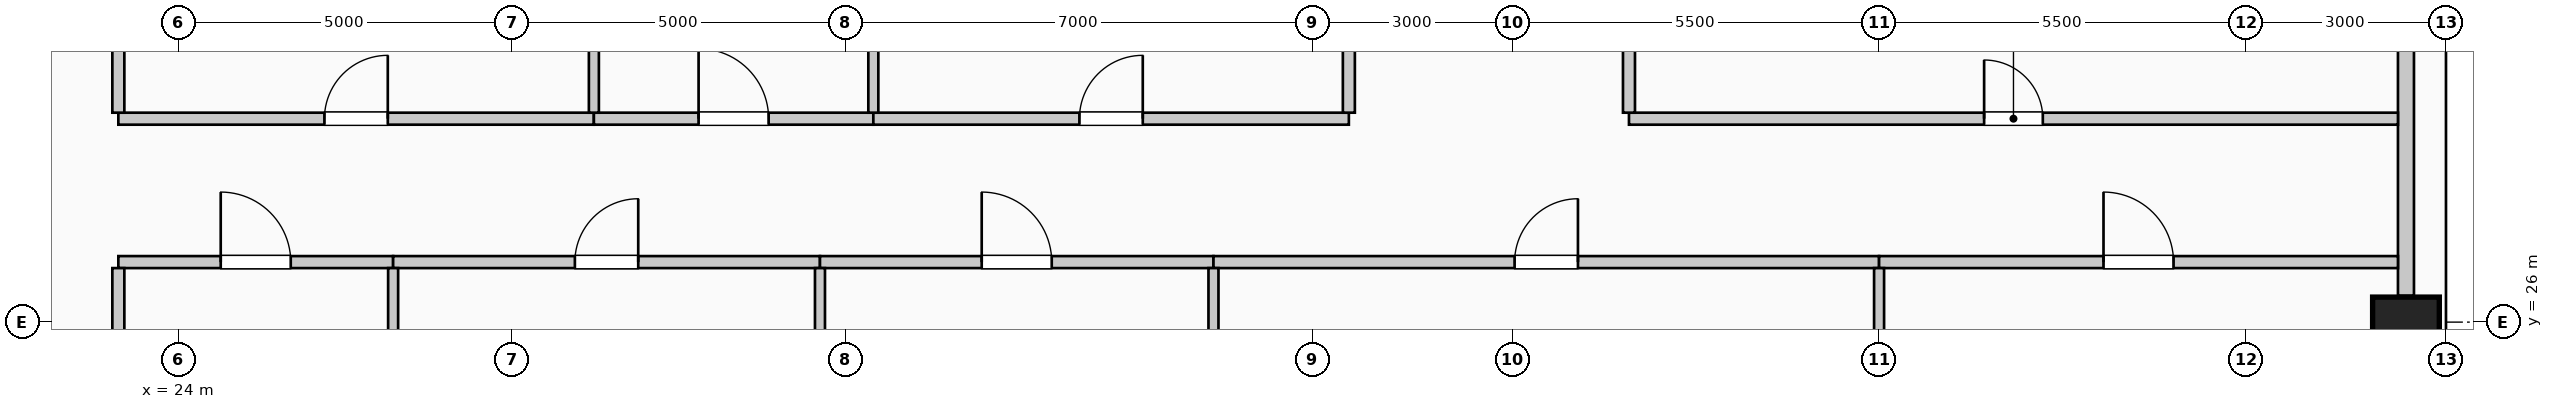
"""IFC4 building model, lengths in metres.
Left out: names, types, materials, properties, quantities, classifications, styles, units other than length and angle.
Written with IfcOpenShell. Run it as: python <this file> out.ifc"""

import sys

from ifc_helpers import new_model, si_unit, direction, frame, frame_2d, origin, origin_2d, place, context, subcontext, project, spatial, rectangle, extrude, element, fill, save


model = new_model("IFC4")
c1 = context("Model", 3, precision=1e-05, world=origin(), true_north=direction((0.0, 1.0)))
c2 = subcontext(c1, "Body", "Model", "MODEL_VIEW")
j1 = project(units=[si_unit("LENGTHUNIT", "METRE"), si_unit("PLANEANGLEUNIT", "RADIAN")], contexts=[c1])
p1 = place(None, origin())
s1 = spatial("IfcSite", under=j1, at=p1, CompositionType="ELEMENT")
p2 = place(p1, origin())
s2 = spatial("IfcBuilding", under=s1, at=p2, CompositionType="ELEMENT")
p3 = place(p2, frame((0.0, 0.0, 268.6)))
s3 = spatial("IfcBuildingStorey", under=s2, at=p3, CompositionType="ELEMENT", Elevation=268.6)
p4 = place(p3, frame((57.4, 26.0, 0.0), z_axis=(0.0, 0.0, 1.0), x_axis=(0.0, 1.0, 0.0)))
e1 = element("IfcColumn", 1, at=p4, inside=s3, PredefinedType="COLUMN", context=c2, shape_type="SweptSolid", body=[
    extrude(rectangle(XDim=0.75, YDim=1.0, at=origin_2d()), origin(), (0.0, 0.0, 1.0), 4.0),
])
p5 = place(p3, frame((57.4, 33.605, 0.0), z_axis=(0.0, 0.0, 1.0), x_axis=(0.0, -1.0, 0.0)))
e2 = element("IfcWall", 2, at=p5, inside=s3, PredefinedType="SOLIDWALL", context=c2, shape_type="SweptSolid", body=[
    extrude(rectangle(XDim=7.21, YDim=0.24, at=frame_2d((3.605, 0.0))), origin(), (0.0, 0.0, 1.0), 3.0),
])
p6 = place(p3, frame((23.1, 26.9, 0.0), z_axis=(0.0, 0.0, 1.0), x_axis=(1.0, 0.0, 0.0)))
e3 = element("IfcWall", 3, at=p6, inside=s3, PredefinedType="PARTITIONING", context=c2, shape_type="SweptSolid", body=[
    extrude(rectangle(XDim=4.12, YDim=0.18, at=frame_2d((2.06, 0.0))), origin(), (0.0, 0.0, 1.0), 3.75),
])
p7 = place(p6, frame((1.535, 0.0, 0.0)))
e4 = element("IfcOpeningElement", 4, at=p7, cuts=e3, PredefinedType="OPENING", context=c2, shape_type="SweptSolid", body=[
    extrude(rectangle(XDim=1.05, YDim=2.15, at=frame_2d((0.525, 1.075))), frame((0.0, 0.1, 0.0), z_axis=(0.0, -1.0, 0.0), x_axis=(1.0, 0.0, 0.0)), (0.0, 0.0, 1.0), 0.2),
])
p8 = place(p3, frame((27.22, 26.9, 0.0), z_axis=(0.0, 0.0, 1.0), x_axis=(1.0, 0.0, 0.0)))
e5 = element("IfcWall", 5, at=p8, inside=s3, PredefinedType="PARTITIONING", context=c2, shape_type="SweptSolid", body=[
    extrude(rectangle(XDim=6.4, YDim=0.18, at=frame_2d((3.2, 0.0))), origin(), (0.0, 0.0, 1.0), 3.75),
])
p9 = place(p8, frame((2.725, 0.0, 0.0)))
e6 = element("IfcOpeningElement", 6, at=p9, cuts=e5, PredefinedType="OPENING", context=c2, shape_type="SweptSolid", body=[
    extrude(rectangle(XDim=0.95, YDim=2.15, at=frame_2d((0.475, 1.075))), frame((0.0, 0.1, 0.0), z_axis=(0.0, -1.0, 0.0), x_axis=(1.0, 0.0, 0.0)), (0.0, 0.0, 1.0), 0.2),
])
p10 = place(p3, frame((33.62, 26.9, 0.0), z_axis=(0.0, 0.0, 1.0), x_axis=(1.0, 0.0, 0.0)))
e7 = element("IfcWall", 7, at=p10, inside=s3, PredefinedType="PARTITIONING", context=c2, shape_type="SweptSolid", body=[
    extrude(rectangle(XDim=5.9, YDim=0.18, at=frame_2d((2.95, 0.0))), origin(), (0.0, 0.0, 1.0), 3.75),
])
p11 = place(p10, frame((2.425, 0.0, 0.0)))
e8 = element("IfcOpeningElement", 8, at=p11, cuts=e7, PredefinedType="OPENING", context=c2, shape_type="SweptSolid", body=[
    extrude(rectangle(XDim=1.05, YDim=2.15, at=frame_2d((0.525, 1.075))), frame((0.0, 0.1, 0.0), z_axis=(0.0, -1.0, 0.0), x_axis=(1.0, 0.0, 0.0)), (0.0, 0.0, 1.0), 0.2),
])
p12 = place(p3, frame((39.52, 26.9, 0.0), z_axis=(0.0, 0.0, 1.0), x_axis=(1.0, 0.0, 0.0)))
e9 = element("IfcWall", 9, at=p12, inside=s3, PredefinedType="PARTITIONING", context=c2, shape_type="SweptSolid", body=[
    extrude(rectangle(XDim=9.98, YDim=0.18, at=frame_2d((4.99, 0.0))), origin(), (0.0, 0.0, 1.0), 3.75),
])
p13 = place(p12, frame((4.515, 0.0, 0.0)))
e10 = element("IfcOpeningElement", 10, at=p13, cuts=e9, PredefinedType="OPENING", context=c2, shape_type="SweptSolid", body=[
    extrude(rectangle(XDim=0.95, YDim=2.15, at=frame_2d((0.475, 1.075))), frame((0.0, 0.1, 0.0), z_axis=(0.0, -1.0, 0.0), x_axis=(1.0, 0.0, 0.0)), (0.0, 0.0, 1.0), 0.2),
])
p14 = place(p3, frame((49.5, 26.9, 0.0), z_axis=(0.0, 0.0, 1.0), x_axis=(1.0, 0.0, 0.0)))
e11 = element("IfcWall", 11, at=p14, inside=s3, PredefinedType="PARTITIONING", context=c2, shape_type="SweptSolid", body=[
    extrude(rectangle(XDim=7.78, YDim=0.18, at=frame_2d((3.89, 0.0))), origin(), (0.0, 0.0, 1.0), 3.75),
])
p15 = place(p14, frame((3.365, 0.0, 0.0)))
e12 = element("IfcOpeningElement", 12, at=p15, cuts=e11, PredefinedType="OPENING", context=c2, shape_type="SweptSolid", body=[
    extrude(rectangle(XDim=1.05, YDim=2.15, at=frame_2d((0.525, 1.075))), frame((0.0, 0.1, 0.0), z_axis=(0.0, -1.0, 0.0), x_axis=(1.0, 0.0, 0.0)), (0.0, 0.0, 1.0), 0.2),
])
p16 = place(p3, frame((23.1, 29.05, 0.0), z_axis=(0.0, 0.0, 1.0), x_axis=(1.0, 0.0, 0.0)))
e13 = element("IfcWall", 13, at=p16, inside=s3, PredefinedType="PARTITIONING", context=c2, shape_type="SweptSolid", body=[
    extrude(rectangle(XDim=7.13, YDim=0.18, at=frame_2d((3.565, 0.0))), origin(), (0.0, 0.0, 1.0), 3.75),
])
p17 = place(p16, frame((3.09, 0.0, 0.0)))
e14 = element("IfcOpeningElement", 14, at=p17, cuts=e13, PredefinedType="OPENING", context=c2, shape_type="SweptSolid", body=[
    extrude(rectangle(XDim=0.95, YDim=2.15, at=frame_2d((0.475, 1.075))), frame((0.0, 0.1, 0.0), z_axis=(0.0, -1.0, 0.0), x_axis=(1.0, 0.0, 0.0)), (0.0, 0.0, 1.0), 0.2),
])
p18 = place(p3, frame((30.23, 29.05, 0.0), z_axis=(0.0, 0.0, 1.0), x_axis=(1.0, 0.0, 0.0)))
e15 = element("IfcWall", 15, at=p18, inside=s3, PredefinedType="PARTITIONING", context=c2, shape_type="SweptSolid", body=[
    extrude(rectangle(XDim=4.19, YDim=0.18, at=frame_2d((2.095, 0.0))), origin(), (0.0, 0.0, 1.0), 3.75),
])
p19 = place(p18, frame((1.57, 0.0, 0.0)))
e16 = element("IfcOpeningElement", 16, at=p19, cuts=e15, PredefinedType="OPENING", context=c2, shape_type="SweptSolid", body=[
    extrude(rectangle(XDim=1.05, YDim=2.15, at=frame_2d((0.525, 1.075))), frame((0.0, 0.1, 0.0), z_axis=(0.0, -1.0, 0.0), x_axis=(1.0, 0.0, 0.0)), (0.0, 0.0, 1.0), 0.2),
])
p20 = place(p3, frame((34.42, 29.05, 0.0), z_axis=(0.0, 0.0, 1.0), x_axis=(1.0, 0.0, 0.0)))
e17 = element("IfcWall", 17, at=p20, inside=s3, PredefinedType="PARTITIONING", context=c2, shape_type="SweptSolid", body=[
    extrude(rectangle(XDim=7.13, YDim=0.18, at=frame_2d((3.565, 0.0))), origin(), (0.0, 0.0, 1.0), 3.75),
])
p21 = place(p20, frame((3.09, 0.0, 0.0)))
e18 = element("IfcOpeningElement", 18, at=p21, cuts=e17, PredefinedType="OPENING", context=c2, shape_type="SweptSolid", body=[
    extrude(rectangle(XDim=0.95, YDim=2.15, at=frame_2d((0.475, 1.075))), frame((0.0, 0.1, 0.0), z_axis=(0.0, -1.0, 0.0), x_axis=(1.0, 0.0, 0.0)), (0.0, 0.0, 1.0), 0.2),
])
p22 = place(p3, frame((45.75, 29.05, 0.0), z_axis=(0.0, 0.0, 1.0), x_axis=(1.0, 0.0, 0.0)))
e19 = element("IfcWall", 19, at=p22, inside=s3, PredefinedType="PARTITIONING", context=c2, shape_type="SweptSolid", body=[
    extrude(rectangle(XDim=11.53, YDim=0.18, at=frame_2d((5.765, 0.0))), origin(), (0.0, 0.0, 1.0), 3.75),
])
p23 = place(p22, frame((5.325, 0.0, 0.0)))
e20 = element("IfcOpeningElement", 20, at=p23, cuts=e19, PredefinedType="OPENING", context=c2, shape_type="SweptSolid", body=[
    extrude(rectangle(XDim=0.88, YDim=2.1, at=frame_2d((0.44, 1.05))), frame((0.0, 0.1, 0.0), z_axis=(0.0, -1.0, 0.0), x_axis=(1.0, 0.0, 0.0)), (0.0, 0.0, 1.0), 0.2),
])
p24 = place(p3, frame((23.1, 17.3, 0.0), z_axis=(0.0, 0.0, 1.0), x_axis=(0.0, 1.0, 0.0)))
e21 = element("IfcWall", 21, at=p24, inside=s3, PredefinedType="PARTITIONING", context=c2, shape_type="SweptSolid", body=[
    extrude(rectangle(XDim=9.51, YDim=0.18, at=frame_2d((4.755, 0.0))), origin(), (0.0, 0.0, 1.0), 3.75),
])
p25 = place(p3, frame((23.1, 29.14, 0.0), z_axis=(0.0, 0.0, 1.0), x_axis=(0.0, 1.0, 0.0)))
e22 = element("IfcWall", 22, at=p25, inside=s3, PredefinedType="PARTITIONING", context=c2, shape_type="SweptSolid", body=[
    extrude(rectangle(XDim=3.12, YDim=0.18, at=frame_2d((1.56, 0.0))), origin(), (0.0, 0.0, 1.0), 3.75),
])
p26 = place(p3, frame((27.22, 0.72, 0.0), z_axis=(0.0, 0.0, 1.0), x_axis=(0.0, 1.0, 0.0)))
e23 = element("IfcWall", 23, at=p26, inside=s3, PredefinedType="PARTITIONING", context=c2, shape_type="SweptSolid", body=[
    extrude(rectangle(XDim=26.09, YDim=0.15, at=frame_2d((13.045, 0.0))), origin(), (0.0, 0.0, 1.0), 3.75),
])
p27 = place(p3, frame((30.23, 29.14, 0.0), z_axis=(0.0, 0.0, 1.0), x_axis=(0.0, 1.0, 0.0)))
e24 = element("IfcWall", 24, at=p27, inside=s3, PredefinedType="PARTITIONING", context=c2, shape_type="SweptSolid", body=[
    extrude(rectangle(XDim=16.14, YDim=0.15, at=frame_2d((8.07, 0.0))), origin(), (0.0, 0.0, 1.0), 3.75),
])
p28 = place(p3, frame((33.62, 18.425, 0.0), z_axis=(0.0, 0.0, 1.0), x_axis=(0.0, 1.0, 0.0)))
e25 = element("IfcWall", 25, at=p28, inside=s3, PredefinedType="PARTITIONING", context=c2, shape_type="SweptSolid", body=[
    extrude(rectangle(XDim=8.385, YDim=0.15, at=frame_2d((4.192, 0.0))), origin(), (0.0, 0.0, 1.0), 3.75),
])
p29 = place(p3, frame((34.42, 29.14, 0.0), z_axis=(0.0, 0.0, 1.0), x_axis=(0.0, 1.0, 0.0)))
e26 = element("IfcWall", 26, at=p29, inside=s3, PredefinedType="PARTITIONING", context=c2, shape_type="SweptSolid", body=[
    extrude(rectangle(XDim=4.435, YDim=0.15, at=frame_2d((2.218, 0.0))), origin(), (0.0, 0.0, 1.0), 3.75),
])
p30 = place(p3, frame((39.52, 0.72, 0.0), z_axis=(0.0, 0.0, 1.0), x_axis=(0.0, 1.0, 0.0)))
e27 = element("IfcWall", 27, at=p30, inside=s3, PredefinedType="PARTITIONING", context=c2, shape_type="SweptSolid", body=[
    extrude(rectangle(XDim=26.09, YDim=0.15, at=frame_2d((13.045, 0.0))), origin(), (0.0, 0.0, 1.0), 3.75),
])
p31 = place(p3, frame((41.55, 29.14, 0.0), z_axis=(0.0, 0.0, 1.0), x_axis=(0.0, 1.0, 0.0)))
e28 = element("IfcWall", 28, at=p31, inside=s3, PredefinedType="PARTITIONING", context=c2, shape_type="SweptSolid", body=[
    extrude(rectangle(XDim=3.21, YDim=0.18, at=frame_2d((1.605, 0.0))), origin(), (0.0, 0.0, 1.0), 3.195),
])
p32 = place(p3, frame((45.75, 29.14, 0.0), z_axis=(0.0, 0.0, 1.0), x_axis=(0.0, 1.0, 0.0)))
e29 = element("IfcWall", 29, at=p32, inside=s3, PredefinedType="PARTITIONING", context=c2, shape_type="SweptSolid", body=[
    extrude(rectangle(XDim=3.135, YDim=0.18, at=frame_2d((1.567, 0.0))), origin(), (0.0, 0.0, 1.0), 3.75),
])
p33 = place(p3, frame((49.5, 1.1, 0.0), z_axis=(0.0, 0.0, 1.0), x_axis=(0.0, 1.0, 0.0)))
e30 = element("IfcWall", 30, at=p33, inside=s3, PredefinedType="PARTITIONING", context=c2, shape_type="SweptSolid", body=[
    extrude(rectangle(XDim=25.71, YDim=0.15, at=frame_2d((12.855, 0.0))), origin(), (0.0, 0.0, 1.0), 3.75),
])
p34 = place(p7, origin())
e31 = element("IfcDoor", 31, at=p34, inside=s3, OperationType="SINGLE_SWING_LEFT", PredefinedType="DOOR", context=c2, shape_type="SweptSolid", body=[
    extrude(rectangle(XDim=1.05, YDim=2.15, at=frame_2d((0.525, 1.075))), frame((0.0, 0.025, 0.0), z_axis=(0.0, -1.0, 0.0), x_axis=(1.0, 0.0, 0.0)), (0.0, 0.0, 1.0), 0.05),
])
fill(e4, e31)
p35 = place(p9, origin())
e32 = element("IfcDoor", 32, at=p35, inside=s3, OperationType="SINGLE_SWING_RIGHT", PredefinedType="DOOR", context=c2, shape_type="SweptSolid", body=[
    extrude(rectangle(XDim=0.95, YDim=2.15, at=frame_2d((0.475, 1.075))), frame((0.0, 0.025, 0.0), z_axis=(0.0, -1.0, 0.0), x_axis=(1.0, 0.0, 0.0)), (0.0, 0.0, 1.0), 0.05),
])
fill(e6, e32)
p36 = place(p11, origin())
e33 = element("IfcDoor", 33, at=p36, inside=s3, OperationType="SINGLE_SWING_LEFT", PredefinedType="DOOR", context=c2, shape_type="SweptSolid", body=[
    extrude(rectangle(XDim=1.05, YDim=2.15, at=frame_2d((0.525, 1.075))), frame((0.0, 0.025, 0.0), z_axis=(0.0, -1.0, 0.0), x_axis=(1.0, 0.0, 0.0)), (0.0, 0.0, 1.0), 0.05),
])
fill(e8, e33)
p37 = place(p13, origin())
e34 = element("IfcDoor", 34, at=p37, inside=s3, OperationType="SINGLE_SWING_RIGHT", PredefinedType="DOOR", context=c2, shape_type="SweptSolid", body=[
    extrude(rectangle(XDim=0.95, YDim=2.15, at=frame_2d((0.475, 1.075))), frame((0.0, 0.025, 0.0), z_axis=(0.0, -1.0, 0.0), x_axis=(1.0, 0.0, 0.0)), (0.0, 0.0, 1.0), 0.05),
])
fill(e10, e34)
p38 = place(p15, origin())
e35 = element("IfcDoor", 35, at=p38, inside=s3, OperationType="SINGLE_SWING_LEFT", PredefinedType="DOOR", context=c2, shape_type="SweptSolid", body=[
    extrude(rectangle(XDim=1.05, YDim=2.15, at=frame_2d((0.525, 1.075))), frame((0.0, 0.025, 0.0), z_axis=(0.0, -1.0, 0.0), x_axis=(1.0, 0.0, 0.0)), (0.0, 0.0, 1.0), 0.05),
])
fill(e12, e35)
p39 = place(p17, origin())
e36 = element("IfcDoor", 36, at=p39, inside=s3, OperationType="SINGLE_SWING_RIGHT", PredefinedType="DOOR", context=c2, shape_type="SweptSolid", body=[
    extrude(rectangle(XDim=0.95, YDim=2.15, at=frame_2d((0.475, 1.075))), frame((0.0, 0.025, 0.0), z_axis=(0.0, -1.0, 0.0), x_axis=(1.0, 0.0, 0.0)), (0.0, 0.0, 1.0), 0.05),
])
fill(e14, e36)
p40 = place(p19, origin())
e37 = element("IfcDoor", 37, at=p40, inside=s3, OperationType="SINGLE_SWING_LEFT", PredefinedType="DOOR", context=c2, shape_type="SweptSolid", body=[
    extrude(rectangle(XDim=1.05, YDim=2.15, at=frame_2d((0.525, 1.075))), frame((0.0, 0.025, 0.0), z_axis=(0.0, -1.0, 0.0), x_axis=(1.0, 0.0, 0.0)), (0.0, 0.0, 1.0), 0.05),
])
fill(e16, e37)
p41 = place(p21, origin())
e38 = element("IfcDoor", 38, at=p41, inside=s3, OperationType="SINGLE_SWING_RIGHT", PredefinedType="DOOR", context=c2, shape_type="SweptSolid", body=[
    extrude(rectangle(XDim=0.95, YDim=2.15, at=frame_2d((0.475, 1.075))), frame((0.0, 0.025, 0.0), z_axis=(0.0, -1.0, 0.0), x_axis=(1.0, 0.0, 0.0)), (0.0, 0.0, 1.0), 0.05),
])
fill(e18, e38)
p42 = place(p23, origin())
e39 = element("IfcDoor", 39, at=p42, inside=s3, OperationType="SINGLE_SWING_LEFT", PredefinedType="DOOR", context=c2, shape_type="SweptSolid", body=[
    extrude(rectangle(XDim=0.88, YDim=2.1, at=frame_2d((0.44, 1.05))), frame((0.0, 0.025, 0.0), z_axis=(0.0, -1.0, 0.0), x_axis=(1.0, 0.0, 0.0)), (0.0, 0.0, 1.0), 0.05),
])
fill(e20, e39)
save(model, sys.argv[1])
